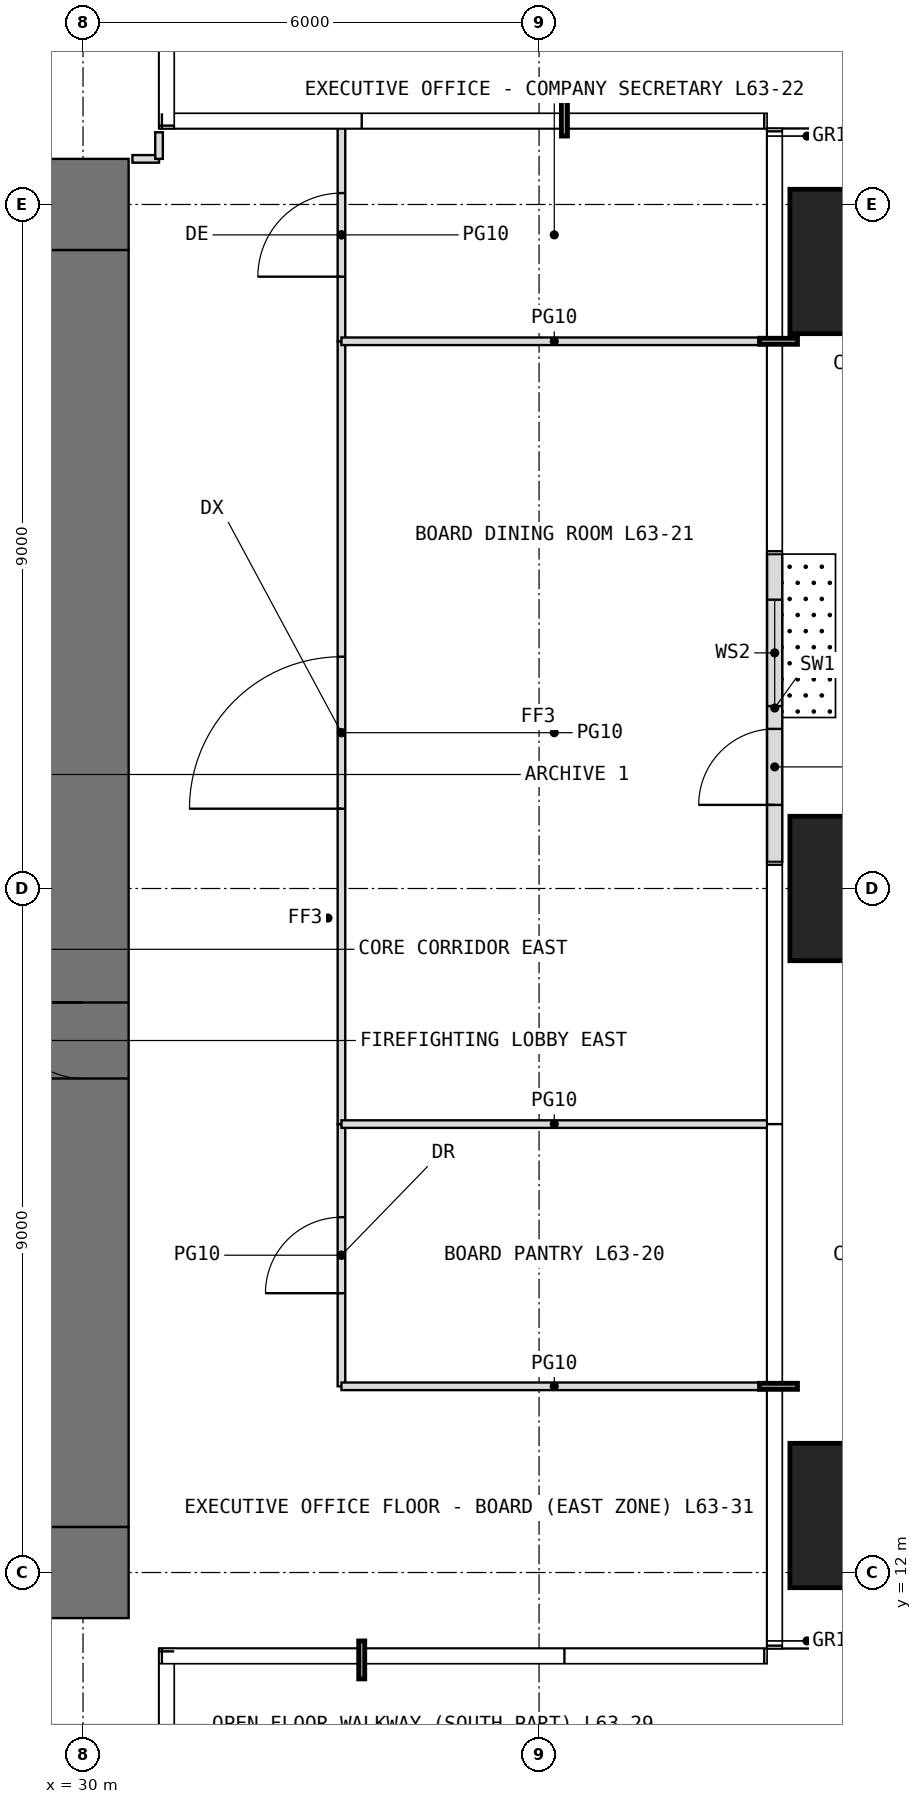
"""IFC4 building model, lengths in metres.
Left out: names, types, materials, properties, quantities, classifications, styles, units other than length and angle.
Written with IfcOpenShell. Run it as: python <this file> out.ifc"""

import sys

from ifc_helpers import new_model, si_unit, direction, frame, frame_2d, origin, origin_2d, place, context, subcontext, project, spatial, rectangle, extrude, element, fill, save


model = new_model("IFC4")
c1 = context("Model", 3, precision=1e-05, world=origin(), true_north=direction((0.0, 1.0)))
c2 = subcontext(c1, "Body", "Model", "MODEL_VIEW")
j1 = project(units=[si_unit("LENGTHUNIT", "METRE"), si_unit("PLANEANGLEUNIT", "RADIAN")], contexts=[c1])
p1 = place(None, origin())
s1 = spatial("IfcSite", under=j1, at=p1, CompositionType="ELEMENT")
p2 = place(p1, origin())
s2 = spatial("IfcBuilding", under=s1, at=p2, CompositionType="ELEMENT")
p3 = place(p2, frame((0.0, 0.0, 265.0)))
s3 = spatial("IfcBuildingStorey", under=s2, at=p3, CompositionType="ELEMENT", Elevation=265.0)
for number, where, z_axis, x_axis in (
    (1, (40.25, 12.75, 0.0), (0.0, 0.0, 1.0), (1.0, 0.0, 0.0)),
    (2, (40.25, 21.0, 0.0), (0.0, 0.0, 1.0), (1.0, 0.0, 0.0)),
    (3, (40.25, 29.25, 0.0), (0.0, 0.0, 1.0), (1.0, 0.0, 0.0)),
):
    element("IfcColumn", number, at=place(p3, frame(where, z_axis=z_axis, x_axis=x_axis)), inside=s3, PredefinedType="COLUMN", context=c2, shape_type="SweptSolid", body=[
        extrude(rectangle(XDim=1.9, YDim=1.9, at=origin_2d()), origin(), (0.0, 0.0, 1.0), 4.2),
    ])
p4 = place(p3, frame((39.1, 21.35, 0.0), z_axis=(0.0, 0.0, 1.0), x_axis=(0.0, 1.0, 0.0)))
e4 = element("IfcWall", 4, at=p4, inside=s3, PredefinedType="USERDEFINED", context=c2, shape_type="SweptSolid", body=[
    extrude(rectangle(XDim=4.05, YDim=0.2, at=frame_2d((2.025, 0.0))), origin(), (0.0, 0.0, 1.0), 3.95),
])
p5 = place(p4, frame((0.75, 0.0, 0.0)))
e5 = element("IfcOpeningElement", 5, at=p5, cuts=e4, PredefinedType="OPENING", context=c2, shape_type="SweptSolid", body=[
    extrude(rectangle(XDim=1.0, YDim=2.4, at=frame_2d((0.5, 1.2))), frame((0.0, 0.11, 0.0), z_axis=(0.0, -1.0, 0.0), x_axis=(1.0, 0.0, 0.0)), (0.0, 0.0, 1.0), 0.22),
])
p6 = place(p4, frame((2.05, 0.0, 0.3)))
e6 = element("IfcOpeningElement", 6, at=p6, cuts=e4, PredefinedType="OPENING", context=c2, shape_type="SweptSolid", body=[
    extrude(rectangle(XDim=1.4, YDim=2.7, at=frame_2d((0.7, 1.35))), frame((0.0, 0.11, 0.0), z_axis=(0.0, -1.0, 0.0), x_axis=(1.0, 0.0, 0.0)), (0.0, 0.0, 1.0), 0.22),
])
p7 = place(p3, frame((11.4, 12.0, -0.05), z_axis=(0.0, 0.0, 1.0), x_axis=(1.0, 0.0, 0.0)))
e7 = element("IfcWall", 7, at=p7, inside=s3, PredefinedType="SHEAR", context=c2, shape_type="SweptSolid", body=[
    extrude(rectangle(XDim=19.2, YDim=1.2, at=frame_2d((9.6, 0.0))), origin(), (0.0, 0.0, 1.0), 4.2),
])
p8 = place(p7, frame((8.6, 0.0, 0.05)))
e8 = element("IfcOpeningElement", 8, at=p8, cuts=e7, PredefinedType="OPENING", context=c2, shape_type="SweptSolid", body=[
    extrude(rectangle(XDim=2.0, YDim=2.2, at=frame_2d((1.0, 1.1))), frame((0.0, 0.61, 0.0), z_axis=(0.0, -1.0, 0.0), x_axis=(1.0, 0.0, 0.0)), (0.0, 0.0, 1.0), 1.22),
])
p9 = place(p3, frame((11.4, 30.0, -0.05), z_axis=(0.0, 0.0, 1.0), x_axis=(1.0, 0.0, 0.0)))
e9 = element("IfcWall", 9, at=p9, inside=s3, PredefinedType="SHEAR", context=c2, shape_type="SweptSolid", body=[
    extrude(rectangle(XDim=19.2, YDim=1.2, at=frame_2d((9.6, 0.0))), origin(), (0.0, 0.0, 1.0), 4.2),
])
p10 = place(p9, frame((8.6, 0.0, 0.05)))
e10 = element("IfcOpeningElement", 10, at=p10, cuts=e9, PredefinedType="OPENING", context=c2, shape_type="SweptSolid", body=[
    extrude(rectangle(XDim=2.0, YDim=2.2, at=frame_2d((1.0, 1.1))), frame((0.0, 0.61, 0.0), z_axis=(0.0, -1.0, 0.0), x_axis=(1.0, 0.0, 0.0)), (0.0, 0.0, 1.0), 1.22),
])
p11 = place(p3, frame((30.0, 12.6, -0.05), z_axis=(0.0, 0.0, 1.0), x_axis=(0.0, 1.0, 0.0)))
e11 = element("IfcWall", 11, at=p11, inside=s3, PredefinedType="SHEAR", context=c2, shape_type="SweptSolid", body=[
    extrude(rectangle(XDim=16.8, YDim=1.2, at=frame_2d((8.4, 0.0))), origin(), (0.0, 0.0, 1.0), 4.2),
])
p12 = place(p11, frame((5.9, 0.0, 0.05)))
e12 = element("IfcOpeningElement", 12, at=p12, cuts=e11, PredefinedType="OPENING", context=c2, shape_type="SweptSolid", body=[
    extrude(rectangle(XDim=1.0, YDim=2.2, at=frame_2d((0.5, 1.1))), frame((0.0, 0.61, 0.0), z_axis=(0.0, -1.0, 0.0), x_axis=(1.0, 0.0, 0.0)), (0.0, 0.0, 1.0), 1.22),
])
p13 = place(p3, frame((30.65, 30.6, 0.0), z_axis=(0.0, 0.0, 1.0), x_axis=(1.0, 0.0, 0.0)))
e13 = element("IfcWall", 13, at=p13, inside=s3, PredefinedType="PARTITIONING", context=c2, shape_type="SweptSolid", body=[
    extrude(rectangle(XDim=0.35, YDim=0.1, at=frame_2d((0.175, 0.0))), origin(), (0.0, 0.0, 1.0), 3.95),
])
p14 = place(p3, frame((31.0, 30.6, 0.0), z_axis=(0.0, 0.0, 1.0), x_axis=(0.0, 1.0, 0.0)))
e14 = element("IfcWall", 14, at=p14, inside=s3, PredefinedType="PARTITIONING", context=c2, shape_type="SweptSolid", body=[
    extrude(rectangle(XDim=0.35, YDim=0.1, at=frame_2d((0.175, 0.0))), origin(), (0.0, 0.0, 1.0), 3.95),
])
p15 = place(p3, frame((33.4, 14.45, 0.0), z_axis=(0.0, 0.0, 1.0), x_axis=(0.0, 1.0, 0.0)))
e15 = element("IfcWall", 15, at=p15, inside=s3, PredefinedType="PARTITIONING", context=c2, shape_type="SweptSolid", body=[
    extrude(rectangle(XDim=3.45, YDim=0.1, at=frame_2d((1.725, 0.0))), origin(), (0.0, 0.0, 1.0), 3.95),
])
p16 = place(p15, frame((1.225, 0.0, 0.0)))
e16 = element("IfcOpeningElement", 16, at=p16, cuts=e15, PredefinedType="OPENING", context=c2, shape_type="SweptSolid", body=[
    extrude(rectangle(XDim=1.0, YDim=2.2, at=frame_2d((0.5, 1.1))), frame((0.0, 0.06, 0.0), z_axis=(0.0, -1.0, 0.0), x_axis=(1.0, 0.0, 0.0)), (0.0, 0.0, 1.0), 0.12),
])
p17 = place(p3, frame((33.4, 14.45, 0.0), z_axis=(0.0, 0.0, 1.0), x_axis=(1.0, 0.0, 0.0)))
e17 = element("IfcWall", 17, at=p17, inside=s3, PredefinedType="PARTITIONING", context=c2, shape_type="SweptSolid", body=[
    extrude(rectangle(XDim=5.6, YDim=0.1, at=frame_2d((2.8, 0.0))), origin(), (0.0, 0.0, 1.0), 3.95),
])
p18 = place(p3, frame((33.4, 17.9, 0.0), z_axis=(0.0, 0.0, 1.0), x_axis=(0.0, 1.0, 0.0)))
e18 = element("IfcWall", 18, at=p18, inside=s3, PredefinedType="PARTITIONING", context=c2, shape_type="SweptSolid", body=[
    extrude(rectangle(XDim=10.3, YDim=0.1, at=frame_2d((5.15, 0.0))), origin(), (0.0, 0.0, 1.0), 3.95),
])
p19 = place(p18, frame((4.15, 0.0, 0.0)))
e19 = element("IfcOpeningElement", 19, at=p19, cuts=e18, PredefinedType="OPENING", context=c2, shape_type="SweptSolid", body=[
    extrude(rectangle(XDim=2.0, YDim=2.4, at=frame_2d((1.0, 1.2))), frame((0.0, 0.06, 0.0), z_axis=(0.0, -1.0, 0.0), x_axis=(1.0, 0.0, 0.0)), (0.0, 0.0, 1.0), 0.12),
])
p20 = place(p3, frame((33.4, 17.9, 0.0), z_axis=(0.0, 0.0, 1.0), x_axis=(1.0, 0.0, 0.0)))
e20 = element("IfcWall", 20, at=p20, inside=s3, PredefinedType="PARTITIONING", context=c2, shape_type="SweptSolid", body=[
    extrude(rectangle(XDim=5.6, YDim=0.1, at=frame_2d((2.8, 0.0))), origin(), (0.0, 0.0, 1.0), 3.95),
])
p21 = place(p3, frame((33.4, 28.2, 0.0), z_axis=(0.0, 0.0, 1.0), x_axis=(0.0, 1.0, 0.0)))
e21 = element("IfcWall", 21, at=p21, inside=s3, PredefinedType="PARTITIONING", context=c2, shape_type="SweptSolid", body=[
    extrude(rectangle(XDim=2.8, YDim=0.1, at=frame_2d((1.4, 0.0))), origin(), (0.0, 0.0, 1.0), 3.95),
])
p22 = place(p21, frame((0.85, 0.0, 0.0)))
e22 = element("IfcOpeningElement", 22, at=p22, cuts=e21, PredefinedType="OPENING", context=c2, shape_type="SweptSolid", body=[
    extrude(rectangle(XDim=1.1, YDim=2.3, at=frame_2d((0.55, 1.15))), frame((0.0, 0.06, 0.0), z_axis=(0.0, -1.0, 0.0), x_axis=(1.0, 0.0, 0.0)), (0.0, 0.0, 1.0), 0.12),
])
p23 = place(p3, frame((33.4, 28.2, 0.0), z_axis=(0.0, 0.0, 1.0), x_axis=(1.0, 0.0, 0.0)))
e23 = element("IfcWall", 23, at=p23, inside=s3, PredefinedType="PARTITIONING", context=c2, shape_type="SweptSolid", body=[
    extrude(rectangle(XDim=5.6, YDim=0.1, at=frame_2d((2.8, 0.0))), origin(), (0.0, 0.0, 1.0), 3.95),
])
p24 = place(p5, origin())
e24 = element("IfcDoor", 24, at=p24, inside=s3, OperationType="SINGLE_SWING_LEFT", PredefinedType="DOOR", context=c2, shape_type="SweptSolid", body=[
    extrude(rectangle(XDim=1.0, YDim=2.4, at=frame_2d((0.5, 1.2))), frame((0.0, 0.025, 0.0), z_axis=(0.0, -1.0, 0.0), x_axis=(1.0, 0.0, 0.0)), (0.0, 0.0, 1.0), 0.05),
])
fill(e5, e24)
p25 = place(p6, origin())
e25 = element("IfcWindow", 25, at=p25, inside=s3, PartitioningType="SINGLE_PANEL", PredefinedType="WINDOW", context=c2, shape_type="SweptSolid", body=[
    extrude(rectangle(XDim=1.4, YDim=2.7, at=frame_2d((0.7, 1.35))), frame((0.0, 0.03, 0.0), z_axis=(0.0, -1.0, 0.0), x_axis=(1.0, 0.0, 0.0)), (0.0, 0.0, 1.0), 0.06),
])
fill(e6, e25)
p26 = place(p12, origin())
e26 = element("IfcDoor", 26, at=p26, inside=s3, OperationType="SINGLE_SWING_RIGHT", PredefinedType="DOOR", context=c2, shape_type="SweptSolid", body=[
    extrude(rectangle(XDim=1.0, YDim=2.2, at=frame_2d((0.5, 1.1))), frame((0.0, 0.025, 0.0), z_axis=(0.0, -1.0, 0.0), x_axis=(1.0, 0.0, 0.0)), (0.0, 0.0, 1.0), 0.05),
])
fill(e12, e26)
p27 = place(p16, origin())
e27 = element("IfcDoor", 27, at=p27, inside=s3, OperationType="SINGLE_SWING_LEFT", PredefinedType="DOOR", context=c2, shape_type="SweptSolid", body=[
    extrude(rectangle(XDim=1.0, YDim=2.2, at=frame_2d((0.5, 1.1))), frame((0.0, 0.025, 0.0), z_axis=(0.0, -1.0, 0.0), x_axis=(1.0, 0.0, 0.0)), (0.0, 0.0, 1.0), 0.05),
])
fill(e16, e27)
p28 = place(p19, origin())
e28 = element("IfcDoor", 28, at=p28, inside=s3, OperationType="DOUBLE_DOOR_SINGLE_SWING", PredefinedType="DOOR", context=c2, shape_type="SweptSolid", body=[
    extrude(rectangle(XDim=2.0, YDim=2.4, at=frame_2d((1.0, 1.2))), frame((0.0, 0.025, 0.0), z_axis=(0.0, -1.0, 0.0), x_axis=(1.0, 0.0, 0.0)), (0.0, 0.0, 1.0), 0.05),
])
fill(e19, e28)
p29 = place(p22, origin())
e29 = element("IfcDoor", 29, at=p29, inside=s3, OperationType="SINGLE_SWING_LEFT", PredefinedType="DOOR", context=c2, shape_type="SweptSolid", body=[
    extrude(rectangle(XDim=1.1, YDim=2.3, at=frame_2d((0.55, 1.15))), frame((0.0, 0.025, 0.0), z_axis=(0.0, -1.0, 0.0), x_axis=(1.0, 0.0, 0.0)), (0.0, 0.0, 1.0), 0.05),
])
fill(e22, e29)
save(model, sys.argv[1])
